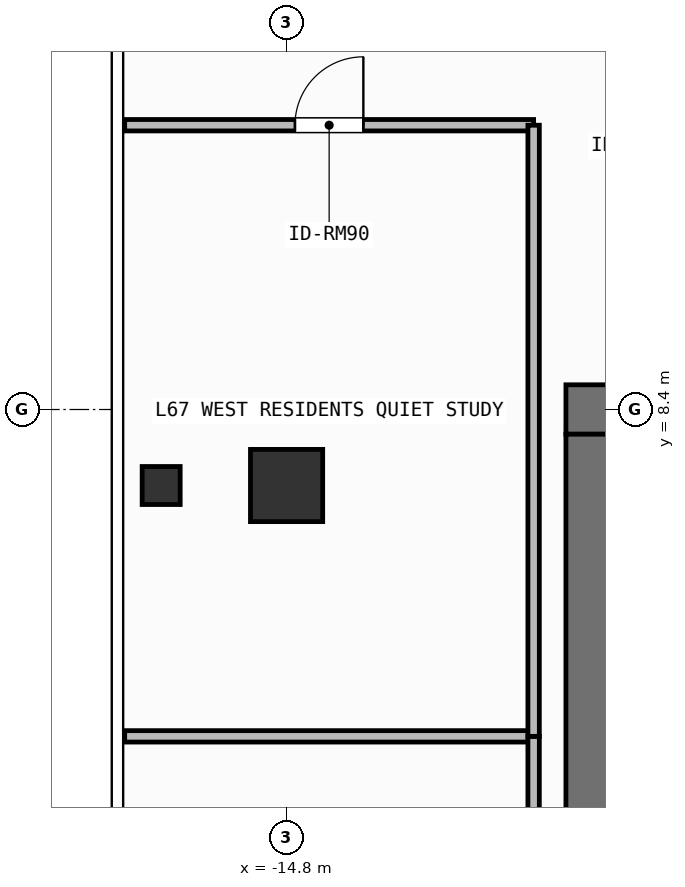
"""IFC4 building model, lengths in metres.
Left out: names, types, materials, properties, quantities, classifications, styles, units other than length and angle.
Written with IfcOpenShell. Run it as: python <this file> out.ifc"""

import sys

from ifc_helpers import new_model, si_unit, direction, frame, frame_2d, origin, origin_2d, place, context, subcontext, project, spatial, rectangle, hollow_rectangle, extrude, element, fill, save


model = new_model("IFC4")
c1 = context("Model", 3, precision=1e-05, world=origin(), true_north=direction((0.0, 1.0)))
c2 = subcontext(c1, "Body", "Model", "MODEL_VIEW")
j1 = project(units=[si_unit("LENGTHUNIT", "METRE"), si_unit("PLANEANGLEUNIT", "RADIAN")], contexts=[c1])
p1 = place(None, origin())
s1 = spatial("IfcSite", under=j1, at=p1, CompositionType="ELEMENT")
p2 = place(p1, origin())
s2 = spatial("IfcBuilding", under=s1, at=p2, CompositionType="ELEMENT")
p3 = place(p2, frame((0.0, 0.0, 274.2)))
s3 = spatial("IfcBuildingStorey", under=s2, at=p3, CompositionType="ELEMENT", Elevation=274.2)
p4 = place(p3, frame((-11.125, 8.4, 0.0), z_axis=(0.0, 0.0, 1.0), x_axis=(1.0, 0.0, 0.0)))
e1 = element("IfcWall", 1, at=p4, inside=s3, PredefinedType="SHEAR", context=c2, shape_type="SweptSolid", body=[
    extrude(rectangle(XDim=1.425, YDim=0.65, at=frame_2d((0.712, 0.0))), origin(), (0.0, 0.0, 1.0), 3.9),
])
p5 = place(p3, frame((-10.8, -8.075, 0.0), z_axis=(0.0, 0.0, 1.0), x_axis=(0.0, 1.0, 0.0)))
e2 = element("IfcWall", 2, at=p5, inside=s3, PredefinedType="SHEAR", context=c2, shape_type="SweptSolid", body=[
    extrude(rectangle(XDim=16.15, YDim=0.65, at=frame_2d((8.075, 0.0))), origin(), (0.0, 0.0, 1.0), 3.9),
])
p6 = place(p3, frame((-14.8, 7.4, 0.0), z_axis=(0.0, 0.0, 1.0), x_axis=(1.0, 0.0, 0.0)))
e3 = element("IfcColumn", 3, at=p6, inside=s3, PredefinedType="COLUMN", context=c2, shape_type="SweptSolid", body=[
    extrude(rectangle(XDim=0.95, YDim=0.95, at=origin_2d()), origin(), (0.0, 0.0, 1.0), 3.9),
])
p7 = place(p3, frame((-16.45, 7.4, 0.0), z_axis=(0.0, 0.0, 1.0), x_axis=(1.0, 0.0, 0.0)))
e4 = element("IfcColumn", 4, at=p7, inside=s3, PredefinedType="COLUMN", context=c2, shape_type="SweptSolid", body=[
    extrude(hollow_rectangle(XDim=0.5, YDim=0.5, WallThickness=0.025, at=origin_2d()), origin(), (0.0, 0.0, 1.0), 3.9),
])
p8 = place(p3, frame((-16.93, 12.14, 0.0), z_axis=(0.0, 0.0, 1.0), x_axis=(1.0, 0.0, 0.0)))
e5 = element("IfcWall", 5, at=p8, inside=s3, PredefinedType="PARTITIONING", context=c2, shape_type="SweptSolid", body=[
    extrude(rectangle(XDim=5.38, YDim=0.15, at=frame_2d((2.69, 0.0))), origin(), (0.0, 0.0, 1.0), 3.68),
])
p9 = place(p8, frame((2.24, 0.0, 0.0)))
e6 = element("IfcOpeningElement", 6, at=p9, cuts=e5, PredefinedType="OPENING", context=c2, shape_type="SweptSolid", body=[
    extrude(rectangle(XDim=0.9, YDim=2.1, at=frame_2d((0.45, 1.05))), frame((0.0, 0.085, 0.0), z_axis=(0.0, -1.0, 0.0), x_axis=(1.0, 0.0, 0.0)), (0.0, 0.0, 1.0), 0.17),
])
p10 = place(p3, frame((-16.93, 4.1, 0.0), z_axis=(0.0, 0.0, 1.0), x_axis=(1.0, 0.0, 0.0)))
e7 = element("IfcWall", 7, at=p10, inside=s3, PredefinedType="PARTITIONING", context=c2, shape_type="SweptSolid", body=[
    extrude(rectangle(XDim=5.38, YDim=0.15, at=frame_2d((2.69, 0.0))), origin(), (0.0, 0.0, 1.0), 3.68),
])
p11 = place(p3, frame((-11.55, -12.14, 0.0), z_axis=(0.0, 0.0, 1.0), x_axis=(0.0, 1.0, 0.0)))
e8 = element("IfcWall", 8, at=p11, inside=s3, PredefinedType="PARTITIONING", context=c2, shape_type="SweptSolid", body=[
    extrude(rectangle(XDim=16.24, YDim=0.15, at=frame_2d((8.12, 0.0))), origin(), (0.0, 0.0, 1.0), 3.68),
])
p12 = place(p3, frame((-11.55, 4.1, 0.0), z_axis=(0.0, 0.0, 1.0), x_axis=(0.0, 1.0, 0.0)))
e9 = element("IfcWall", 9, at=p12, inside=s3, PredefinedType="PARTITIONING", context=c2, shape_type="SweptSolid", body=[
    extrude(rectangle(XDim=8.04, YDim=0.15, at=frame_2d((4.02, 0.0))), origin(), (0.0, 0.0, 1.0), 3.68),
])
p13 = place(p9, origin())
e10 = element("IfcDoor", 10, at=p13, inside=s3, OperationType="SINGLE_SWING_RIGHT", PredefinedType="DOOR", context=c2, shape_type="SweptSolid", body=[
    extrude(rectangle(XDim=0.9, YDim=2.1, at=frame_2d((0.45, 1.05))), frame((0.0, 0.025, 0.0), z_axis=(0.0, -1.0, 0.0), x_axis=(1.0, 0.0, 0.0)), (0.0, 0.0, 1.0), 0.05),
])
fill(e6, e10)
save(model, sys.argv[1])
